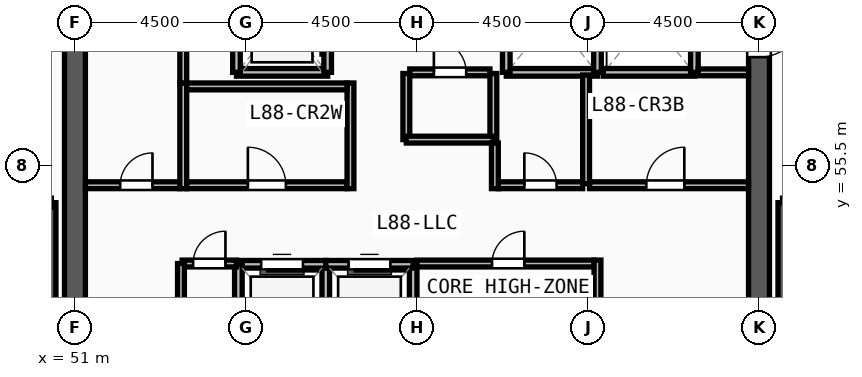
"""IFC4 building model, lengths in metres.
Left out: names, types, materials, properties, quantities, classifications, styles, units other than length and angle.
Written with IfcOpenShell. Run it as: python <this file> out.ifc"""

import sys

from ifc_helpers import new_model, si_unit, direction, frame, frame_2d, origin, place, context, subcontext, project, spatial, rectangle, extrude, source, transform, mapped, element, fill, save


model = new_model("IFC4")
c1 = context("Model", 3, precision=1e-05, world=origin(), true_north=direction((0.0, 1.0)))
c2 = subcontext(c1, "Body", "Model", "MODEL_VIEW")
j1 = project(units=[si_unit("LENGTHUNIT", "METRE"), si_unit("PLANEANGLEUNIT", "RADIAN")], contexts=[c1])
p1 = place(None, origin())
s1 = spatial("IfcSite", under=j1, at=p1, CompositionType="ELEMENT")
p2 = place(p1, origin())
s2 = spatial("IfcBuilding", under=s1, at=p2, CompositionType="ELEMENT")
p3 = place(p2, frame((0.0, 0.0, 339.75)))
s3 = spatial("IfcBuildingStorey", under=s2, at=p3, CompositionType="ELEMENT", Elevation=339.75)
p4 = place(p3, frame((69.0, 60.9, 0.0), z_axis=(0.0, 0.0, 1.0), x_axis=(0.0, -1.0, 0.0)))
e1 = element("IfcWall", 1, at=p4, inside=s3, PredefinedType="SHEAR", context=c2, shape_type="SweptSolid", body=[
    extrude(rectangle(XDim=13.8, YDim=0.55, at=frame_2d((6.9, 0.0))), origin(), (0.0, 0.0, 1.0), 3.57),
])
m1 = source(origin(), c2, "Body", "SweptSolid", [
    extrude(rectangle(XDim=1.2, YDim=2.2, at=frame_2d((0.6, 1.1))), frame((0.0, 0.285, 0.0), z_axis=(0.0, -1.0, 0.0), x_axis=(1.0, 0.0, 0.0)), (0.0, 0.0, 1.0), 0.57),
])
p5 = place(p4, frame((1.35, 0.0, 0.0)))
e2 = element("IfcOpeningElement", 2, at=p5, cuts=e1, PredefinedType="OPENING", context=c2, shape_type="MappedRepresentation", body=[
    mapped(m1, transform((0.0, 0.0, 0.0), x_axis=(1.0, 0.0, 0.0), y_axis=(0.0, 1.0, 0.0), z_axis=(0.0, 0.0, 1.0), scale=1.0)),
])
p6 = place(p3, frame((51.0, 47.1, 0.0), z_axis=(0.0, 0.0, 1.0), x_axis=(0.0, 1.0, 0.0)))
e3 = element("IfcWall", 3, at=p6, inside=s3, PredefinedType="SHEAR", context=c2, shape_type="SweptSolid", body=[
    extrude(rectangle(XDim=13.8, YDim=0.55, at=frame_2d((6.9, 0.0))), origin(), (0.0, 0.0, 1.0), 3.57),
])
for number, where, z_axis, x_axis in (
    (4, (50.38, 46.7, 0.0), (0.0, 0.0, 1.0), (0.0, 1.0, 0.0)),
    (5, (69.62, 54.52, 0.0), (0.0, 0.0, 1.0), (0.0, -1.0, 0.0)),
):
    element("IfcWall", number, at=place(p3, frame(where, z_axis=z_axis, x_axis=x_axis)), inside=s3, PredefinedType="SOLIDWALL", context=c2, shape_type="SweptSolid", body=[
        extrude(rectangle(XDim=7.82, YDim=0.24, at=frame_2d((3.91, 0.0))), origin(), (0.0, 0.0, 1.0), 3.57),
    ])
p7 = place(p3, frame((55.25, 57.95, 0.0), z_axis=(0.0, 0.0, 1.0), x_axis=(1.0, 0.0, 0.0)))
e6 = element("IfcWall", 6, at=p7, inside=s3, PredefinedType="SOLIDWALL", context=c2, shape_type="SweptSolid", body=[
    extrude(rectangle(XDim=2.4, YDim=0.2, at=frame_2d((1.2, 0.0))), origin(), (0.0, 0.0, 1.0), 3.57),
])
p8 = place(p3, frame((57.65, 57.95, 0.0), z_axis=(0.0, 0.0, 1.0), x_axis=(0.0, 1.0, 0.0)))
e7 = element("IfcWall", 7, at=p8, inside=s3, PredefinedType="SOLIDWALL", context=c2, shape_type="SweptSolid", body=[
    extrude(rectangle(XDim=2.93, YDim=0.2, at=frame_2d((1.465, 0.0))), origin(), (0.0, 0.0, 1.0), 3.57),
])
m2 = source(origin(), c2, "Body", "SweptSolid", [
    extrude(rectangle(XDim=1.2, YDim=2.3, at=frame_2d((0.6, 1.15))), frame((0.0, 0.11, 0.0), z_axis=(0.0, -1.0, 0.0), x_axis=(1.0, 0.0, 0.0)), (0.0, 0.0, 1.0), 0.22),
])
p9 = place(p8, frame((0.865, 0.0, 0.0)))
e8 = element("IfcOpeningElement", 8, at=p9, cuts=e7, PredefinedType="OPENING", context=c2, shape_type="MappedRepresentation", body=[
    mapped(m2, transform((0.0, 0.0, 0.0), x_axis=(1.0, 0.0, 0.0), y_axis=(0.0, 1.0, 0.0), z_axis=(0.0, 0.0, 1.0), scale=1.0)),
])
p10 = place(p3, frame((55.25, 60.88, 0.0), z_axis=(0.0, 0.0, 1.0), x_axis=(0.0, -1.0, 0.0)))
e9 = element("IfcWall", 9, at=p10, inside=s3, PredefinedType="SOLIDWALL", context=c2, shape_type="SweptSolid", body=[
    extrude(rectangle(XDim=2.93, YDim=0.2, at=frame_2d((1.465, 0.0))), origin(), (0.0, 0.0, 1.0), 3.57),
])
p11 = place(p3, frame((62.35, 57.95, 0.0), z_axis=(0.0, 0.0, 1.0), x_axis=(1.0, 0.0, 0.0)))
e10 = element("IfcWall", 10, at=p11, inside=s3, PredefinedType="SOLIDWALL", context=c2, shape_type="SweptSolid", body=[
    extrude(rectangle(XDim=2.4, YDim=0.2, at=frame_2d((1.2, 0.0))), origin(), (0.0, 0.0, 1.0), 3.57),
])
for number, where, z_axis, x_axis in (
    (11, (64.75, 57.95, 0.0), (0.0, 0.0, 1.0), (0.0, 1.0, 0.0)),
    (12, (62.35, 60.88, 0.0), (0.0, 0.0, 1.0), (0.0, -1.0, 0.0)),
):
    element("IfcWall", number, at=place(p3, frame(where, z_axis=z_axis, x_axis=x_axis)), inside=s3, PredefinedType="SOLIDWALL", context=c2, shape_type="SweptSolid", body=[
        extrude(rectangle(XDim=2.93, YDim=0.2, at=frame_2d((1.465, 0.0))), origin(), (0.0, 0.0, 1.0), 3.57),
    ])
p12 = place(p3, frame((64.9, 57.95, 0.0), z_axis=(0.0, 0.0, 1.0), x_axis=(1.0, 0.0, 0.0)))
e13 = element("IfcWall", 13, at=p12, inside=s3, PredefinedType="SOLIDWALL", context=c2, shape_type="SweptSolid", body=[
    extrude(rectangle(XDim=2.4, YDim=0.2, at=frame_2d((1.2, 0.0))), origin(), (0.0, 0.0, 1.0), 3.57),
])
p13 = place(p3, frame((67.3, 57.95, 0.0), z_axis=(0.0, 0.0, 1.0), x_axis=(0.0, 1.0, 0.0)))
e14 = element("IfcWall", 14, at=p13, inside=s3, PredefinedType="SOLIDWALL", context=c2, shape_type="SweptSolid", body=[
    extrude(rectangle(XDim=2.93, YDim=0.2, at=frame_2d((1.465, 0.0))), origin(), (0.0, 0.0, 1.0), 3.57),
])
p14 = place(p3, frame((57.6, 50.3, 0.0), z_axis=(0.0, 0.0, 1.0), x_axis=(0.0, 1.0, 0.0)))
e15 = element("IfcWall", 15, at=p14, inside=s3, PredefinedType="SOLIDWALL", context=c2, shape_type="SweptSolid", body=[
    extrude(rectangle(XDim=2.6, YDim=0.2, at=frame_2d((1.3, 0.0))), origin(), (0.0, 0.0, 1.0), 3.57),
])
p15 = place(p3, frame((57.6, 52.9, 0.0), z_axis=(0.0, 0.0, 1.0), x_axis=(-1.0, 0.0, 0.0)))
e16 = element("IfcWall", 16, at=p15, inside=s3, PredefinedType="SOLIDWALL", context=c2, shape_type="SweptSolid", body=[
    extrude(rectangle(XDim=2.3, YDim=0.2, at=frame_2d((1.15, 0.0))), origin(), (0.0, 0.0, 1.0), 3.57),
])
m3 = source(origin(), c2, "Body", "SweptSolid", [
    extrude(rectangle(XDim=1.1, YDim=2.2, at=frame_2d((0.55, 1.1))), frame((0.0, 0.11, 0.0), z_axis=(0.0, -1.0, 0.0), x_axis=(1.0, 0.0, 0.0)), (0.0, 0.0, 1.0), 0.22),
])
p16 = place(p15, frame((0.6, 0.0, 0.0)))
e17 = element("IfcOpeningElement", 17, at=p16, cuts=e16, PredefinedType="OPENING", context=c2, shape_type="MappedRepresentation", body=[
    mapped(m3, transform((0.0, 0.0, 0.0), x_axis=(1.0, 0.0, 0.0), y_axis=(0.0, 1.0, 0.0), z_axis=(0.0, 0.0, 1.0), scale=1.0)),
])
for number, where, z_axis, x_axis in (
    (18, (55.3, 52.9, 0.0), (0.0, 0.0, 1.0), (0.0, -1.0, 0.0)),
    (19, (59.9, 50.3, 0.0), (0.0, 0.0, 1.0), (0.0, 1.0, 0.0)),
):
    element("IfcWall", number, at=place(p3, frame(where, z_axis=z_axis, x_axis=x_axis)), inside=s3, PredefinedType="SOLIDWALL", context=c2, shape_type="SweptSolid", body=[
        extrude(rectangle(XDim=2.6, YDim=0.2, at=frame_2d((1.3, 0.0))), origin(), (0.0, 0.0, 1.0), 3.57),
    ])
p17 = place(p3, frame((59.9, 52.9, 0.0), z_axis=(0.0, 0.0, 1.0), x_axis=(-1.0, 0.0, 0.0)))
e20 = element("IfcWall", 20, at=p17, inside=s3, PredefinedType="SOLIDWALL", context=c2, shape_type="SweptSolid", body=[
    extrude(rectangle(XDim=2.3, YDim=0.2, at=frame_2d((1.15, 0.0))), origin(), (0.0, 0.0, 1.0), 3.57),
])
p18 = place(p17, frame((0.6, 0.0, 0.0)))
e21 = element("IfcOpeningElement", 21, at=p18, cuts=e20, PredefinedType="OPENING", context=c2, shape_type="MappedRepresentation", body=[
    mapped(m3, transform((0.0, 0.0, 0.0), x_axis=(1.0, 0.0, 0.0), y_axis=(0.0, 1.0, 0.0), z_axis=(0.0, 0.0, 1.0), scale=1.0)),
])
p19 = place(p3, frame((60.0, 52.92, 0.0), z_axis=(0.0, 0.0, 1.0), x_axis=(1.0, 0.0, 0.0)))
e22 = element("IfcWall", 22, at=p19, inside=s3, PredefinedType="PARTITIONING", context=c2, shape_type="SweptSolid", body=[
    extrude(rectangle(XDim=4.66, YDim=0.18, at=frame_2d((2.33, 0.0))), origin(), (0.0, 0.0, 1.0), 3.57),
])
m4 = source(origin(), c2, "Body", "SweptSolid", [
    extrude(rectangle(XDim=0.85, YDim=2.1, at=frame_2d((0.425, 1.05))), frame((0.0, 0.1, 0.0), z_axis=(0.0, -1.0, 0.0), x_axis=(1.0, 0.0, 0.0)), (0.0, 0.0, 1.0), 0.2),
])
p20 = place(p19, frame((1.975, 0.0, 0.0)))
e23 = element("IfcOpeningElement", 23, at=p20, cuts=e22, PredefinedType="OPENING", context=c2, shape_type="MappedRepresentation", body=[
    mapped(m4, transform((0.0, 0.0, 0.0), x_axis=(1.0, 0.0, 0.0), y_axis=(0.0, 1.0, 0.0), z_axis=(0.0, 0.0, 1.0), scale=1.0)),
])
p21 = place(p3, frame((53.94, 54.98, 0.0), z_axis=(0.0, 0.0, 1.0), x_axis=(1.0, 0.0, 0.0)))
e24 = element("IfcWall", 24, at=p21, inside=s3, PredefinedType="PARTITIONING", context=c2, shape_type="SweptSolid", body=[
    extrude(rectangle(XDim=4.22, YDim=0.18, at=frame_2d((2.11, 0.0))), origin(), (0.0, 0.0, 1.0), 3.57),
])
m5 = source(origin(), c2, "Body", "SweptSolid", [
    extrude(rectangle(XDim=1.0, YDim=2.2, at=frame_2d((0.5, 1.1))), frame((0.0, 0.1, 0.0), z_axis=(0.0, -1.0, 0.0), x_axis=(1.0, 0.0, 0.0)), (0.0, 0.0, 1.0), 0.2),
])
p22 = place(p21, frame((1.61, 0.0, 0.0)))
e25 = element("IfcOpeningElement", 25, at=p22, cuts=e24, PredefinedType="OPENING", context=c2, shape_type="MappedRepresentation", body=[
    mapped(m5, transform((0.0, 0.0, 0.0), x_axis=(1.0, 0.0, 0.0), y_axis=(0.0, 1.0, 0.0), z_axis=(0.0, 0.0, 1.0), scale=1.0)),
])
p23 = place(p3, frame((51.275, 54.98, 0.0), z_axis=(0.0, 0.0, 1.0), x_axis=(1.0, 0.0, 0.0)))
e26 = element("IfcWall", 26, at=p23, inside=s3, PredefinedType="PARTITIONING", context=c2, shape_type="SweptSolid", body=[
    extrude(rectangle(XDim=2.485, YDim=0.18, at=frame_2d((1.243, 0.0))), origin(), (0.0, 0.0, 1.0), 3.57),
])
p24 = place(p23, frame((0.915, 0.0, 0.0)))
e27 = element("IfcOpeningElement", 27, at=p24, cuts=e26, PredefinedType="OPENING", context=c2, shape_type="MappedRepresentation", body=[
    mapped(m4, transform((0.0, 0.0, 0.0), x_axis=(1.0, 0.0, 0.0), y_axis=(0.0, 1.0, 0.0), z_axis=(0.0, 0.0, 1.0), scale=1.0)),
])
p25 = place(p3, frame((62.14, 54.98, 0.0), z_axis=(0.0, 0.0, 1.0), x_axis=(1.0, 0.0, 0.0)))
e28 = element("IfcWall", 28, at=p25, inside=s3, PredefinedType="PARTITIONING", context=c2, shape_type="SweptSolid", body=[
    extrude(rectangle(XDim=2.22, YDim=0.18, at=frame_2d((1.11, 0.0))), origin(), (0.0, 0.0, 1.0), 3.57),
])
p26 = place(p25, frame((0.685, 0.0, 0.0)))
e29 = element("IfcOpeningElement", 29, at=p26, cuts=e28, PredefinedType="OPENING", context=c2, shape_type="MappedRepresentation", body=[
    mapped(m4, transform((0.0, 0.0, 0.0), x_axis=(1.0, 0.0, 0.0), y_axis=(0.0, 1.0, 0.0), z_axis=(0.0, 0.0, 1.0), scale=1.0)),
])
p27 = place(p3, frame((64.54, 54.98, 0.0), z_axis=(0.0, 0.0, 1.0), x_axis=(1.0, 0.0, 0.0)))
e30 = element("IfcWall", 30, at=p27, inside=s3, PredefinedType="PARTITIONING", context=c2, shape_type="SweptSolid", body=[
    extrude(rectangle(XDim=4.185, YDim=0.18, at=frame_2d((2.093, 0.0))), origin(), (0.0, 0.0, 1.0), 3.57),
])
p28 = place(p27, frame((1.495, 0.0, 0.0)))
e31 = element("IfcOpeningElement", 31, at=p28, cuts=e30, PredefinedType="OPENING", context=c2, shape_type="MappedRepresentation", body=[
    mapped(m5, transform((0.0, 0.0, 0.0), x_axis=(1.0, 0.0, 0.0), y_axis=(0.0, 1.0, 0.0), z_axis=(0.0, 0.0, 1.0), scale=1.0)),
])
p29 = place(p3, frame((59.81, 57.95, 0.0), z_axis=(0.0, 0.0, 1.0), x_axis=(1.0, 0.0, 0.0)))
e32 = element("IfcWall", 32, at=p29, inside=s3, PredefinedType="PARTITIONING", context=c2, shape_type="SweptSolid", body=[
    extrude(rectangle(XDim=2.11, YDim=0.18, at=frame_2d((1.055, 0.0))), origin(), (0.0, 0.0, 1.0), 3.57),
])
p30 = place(p29, frame((0.635, 0.0, 0.0)))
e33 = element("IfcOpeningElement", 33, at=p30, cuts=e32, PredefinedType="OPENING", context=c2, shape_type="MappedRepresentation", body=[
    mapped(m4, transform((0.0, 0.0, 0.0), x_axis=(1.0, 0.0, 0.0), y_axis=(0.0, 1.0, 0.0), z_axis=(0.0, 0.0, 1.0), scale=1.0)),
])
p31 = place(p3, frame((53.82, 52.92, 0.0), z_axis=(0.0, 0.0, 1.0), x_axis=(1.0, 0.0, 0.0)))
e34 = element("IfcWall", 34, at=p31, inside=s3, PredefinedType="PARTITIONING", context=c2, shape_type="SweptSolid", body=[
    extrude(rectangle(XDim=1.43, YDim=0.18, at=frame_2d((0.715, 0.0))), origin(), (0.0, 0.0, 1.0), 3.57),
])
p32 = place(p31, frame((0.29, 0.0, 0.0)))
e35 = element("IfcOpeningElement", 35, at=p32, cuts=e34, PredefinedType="OPENING", context=c2, shape_type="MappedRepresentation", body=[
    mapped(m4, transform((0.0, 0.0, 0.0), x_axis=(1.0, 0.0, 0.0), y_axis=(0.0, 1.0, 0.0), z_axis=(0.0, 0.0, 1.0), scale=1.0)),
])
p33 = place(p3, frame((64.45, 55.02, 0.0), z_axis=(0.0, 0.0, 1.0), x_axis=(0.0, 1.0, 0.0)))
e36 = element("IfcWall", 36, at=p33, inside=s3, PredefinedType="PARTITIONING", context=c2, shape_type="SweptSolid", body=[
    extrude(rectangle(XDim=2.86, YDim=0.18, at=frame_2d((1.43, 0.0))), origin(), (0.0, 0.0, 1.0), 3.57),
])
for number, where, z_axis, x_axis in (
    (37, (59.72, 56.18, 0.0), (0.0, 0.0, 1.0), (0.0, 1.0, 0.0)),
    (38, (62.01, 56.18, 0.0), (0.0, 0.0, 1.0), (0.0, 1.0, 0.0)),
):
    element("IfcWall", number, at=place(p3, frame(where, z_axis=z_axis, x_axis=x_axis)), inside=s3, PredefinedType="PARTITIONING", context=c2, shape_type="SweptSolid", body=[
        extrude(rectangle(XDim=1.74, YDim=0.18, at=frame_2d((0.87, 0.0))), origin(), (0.0, 0.0, 1.0), 3.57),
    ])
p34 = place(p3, frame((59.72, 56.18, 0.0), z_axis=(0.0, 0.0, 1.0), x_axis=(1.0, 0.0, 0.0)))
e39 = element("IfcWall", 39, at=p34, inside=s3, PredefinedType="PARTITIONING", context=c2, shape_type="SweptSolid", body=[
    extrude(rectangle(XDim=2.29, YDim=0.18, at=frame_2d((1.145, 0.0))), origin(), (0.0, 0.0, 1.0), 3.57),
])
p35 = place(p3, frame((53.79, 50.35, 0.0), z_axis=(0.0, 0.0, 1.0), x_axis=(0.0, 1.0, 0.0)))
e40 = element("IfcWall", 40, at=p35, inside=s3, PredefinedType="PARTITIONING", context=c2, shape_type="SweptSolid", body=[
    extrude(rectangle(XDim=2.57, YDim=0.18, at=frame_2d((1.285, 0.0))), origin(), (0.0, 0.0, 1.0), 3.57),
])
p36 = place(p3, frame((64.75, 50.22, 0.0), z_axis=(0.0, 0.0, 1.0), x_axis=(0.0, 1.0, 0.0)))
e41 = element("IfcWall", 41, at=p36, inside=s3, PredefinedType="PARTITIONING", context=c2, shape_type="SweptSolid", body=[
    extrude(rectangle(XDim=2.79, YDim=0.18, at=frame_2d((1.395, 0.0))), origin(), (0.0, 0.0, 1.0), 3.57),
])
for number, where, z_axis, x_axis in (
    (42, (53.85, 54.89, 0.0), (0.0, 0.0, 1.0), (0.0, 1.0, 0.0)),
    (43, (58.25, 54.89, 0.0), (0.0, 0.0, 1.0), (0.0, 1.0, 0.0)),
):
    element("IfcWall", number, at=place(p3, frame(where, z_axis=z_axis, x_axis=x_axis)), inside=s3, PredefinedType="PARTITIONING", context=c2, shape_type="SweptSolid", body=[
        extrude(rectangle(XDim=2.78, YDim=0.18, at=frame_2d((1.39, 0.0))), origin(), (0.0, 0.0, 1.0), 3.57),
    ])
p37 = place(p3, frame((53.94, 57.58, 0.0), z_axis=(0.0, 0.0, 1.0), x_axis=(1.0, 0.0, 0.0)))
e44 = element("IfcWall", 44, at=p37, inside=s3, PredefinedType="PARTITIONING", context=c2, shape_type="SweptSolid", body=[
    extrude(rectangle(XDim=4.22, YDim=0.18, at=frame_2d((2.11, 0.0))), origin(), (0.0, 0.0, 1.0), 3.57),
])
p38 = place(p3, frame((53.85, 57.67, 0.0), z_axis=(0.0, 0.0, 1.0), x_axis=(0.0, 1.0, 0.0)))
e45 = element("IfcWall", 45, at=p38, inside=s3, PredefinedType="PARTITIONING", context=c2, shape_type="SweptSolid", body=[
    extrude(rectangle(XDim=3.42, YDim=0.18, at=frame_2d((1.71, 0.0))), origin(), (0.0, 0.0, 1.0), 3.57),
])
p39 = place(p3, frame((62.05, 54.89, 0.0), z_axis=(0.0, 0.0, 1.0), x_axis=(0.0, 1.0, 0.0)))
e46 = element("IfcWall", 46, at=p39, inside=s3, PredefinedType="PARTITIONING", context=c2, shape_type="SweptSolid", body=[
    extrude(rectangle(XDim=1.2, YDim=0.18, at=frame_2d((0.6, 0.0))), origin(), (0.0, 0.0, 1.0), 3.57),
])
p40 = place(p3, frame((67.4, 57.95, 0.0), z_axis=(0.0, 0.0, 1.0), x_axis=(1.0, 0.0, 0.0)))
e47 = element("IfcWall", 47, at=p40, inside=s3, PredefinedType="PARTITIONING", context=c2, shape_type="SweptSolid", body=[
    extrude(rectangle(XDim=1.325, YDim=0.18, at=frame_2d((0.663, 0.0))), origin(), (0.0, 0.0, 1.0), 3.57),
])
m6 = source(origin(), c2, "Body", "SweptSolid", [
    extrude(rectangle(XDim=1.2, YDim=2.2, at=frame_2d((0.6, 1.1))), frame((0.0, 0.025, 0.0), z_axis=(0.0, -1.0, 0.0), x_axis=(1.0, 0.0, 0.0)), (0.0, 0.0, 1.0), 0.05),
])
p41 = place(p5, origin())
e48 = element("IfcDoor", 48, at=p41, inside=s3, OperationType="SINGLE_SWING_LEFT", PredefinedType="DOOR", context=c2, shape_type="MappedRepresentation", body=[
    mapped(m6, transform((0.0, 0.0, 0.0), x_axis=(1.0, 0.0, 0.0), y_axis=(0.0, 1.0, 0.0), z_axis=(0.0, 0.0, 1.0), scale=1.0)),
])
fill(e2, e48)
m7 = source(origin(), c2, "Body", "SweptSolid", [
    extrude(rectangle(XDim=1.1, YDim=2.2, at=frame_2d((0.55, 1.1))), frame((0.0, 0.025, 0.0), z_axis=(0.0, -1.0, 0.0), x_axis=(1.0, 0.0, 0.0)), (0.0, 0.0, 1.0), 0.05),
])
p42 = place(p16, origin())
e49 = element("IfcDoor", 49, at=p42, inside=s3, OperationType="SLIDING_TO_LEFT", PredefinedType="DOOR", context=c2, shape_type="MappedRepresentation", body=[
    mapped(m7, transform((0.0, 0.0, 0.0), x_axis=(1.0, 0.0, 0.0), y_axis=(0.0, 1.0, 0.0), z_axis=(0.0, 0.0, 1.0), scale=1.0)),
])
fill(e17, e49)
p43 = place(p18, origin())
e50 = element("IfcDoor", 50, at=p43, inside=s3, OperationType="SLIDING_TO_LEFT", PredefinedType="DOOR", context=c2, shape_type="MappedRepresentation", body=[
    mapped(m7, transform((0.0, 0.0, 0.0), x_axis=(1.0, 0.0, 0.0), y_axis=(0.0, 1.0, 0.0), z_axis=(0.0, 0.0, 1.0), scale=1.0)),
])
fill(e21, e50)
m8 = source(origin(), c2, "Body", "SweptSolid", [
    extrude(rectangle(XDim=0.85, YDim=2.1, at=frame_2d((0.425, 1.05))), frame((0.0, 0.025, 0.0), z_axis=(0.0, -1.0, 0.0), x_axis=(1.0, 0.0, 0.0)), (0.0, 0.0, 1.0), 0.05),
])
p44 = place(p20, origin())
e51 = element("IfcDoor", 51, at=p44, inside=s3, OperationType="SINGLE_SWING_RIGHT", PredefinedType="DOOR", context=c2, shape_type="MappedRepresentation", body=[
    mapped(m8, transform((0.0, 0.0, 0.0), x_axis=(1.0, 0.0, 0.0), y_axis=(0.0, 1.0, 0.0), z_axis=(0.0, 0.0, 1.0), scale=1.0)),
])
fill(e23, e51)
m9 = source(origin(), c2, "Body", "SweptSolid", [
    extrude(rectangle(XDim=1.0, YDim=2.2, at=frame_2d((0.5, 1.1))), frame((0.0, 0.025, 0.0), z_axis=(0.0, -1.0, 0.0), x_axis=(1.0, 0.0, 0.0)), (0.0, 0.0, 1.0), 0.05),
])
p45 = place(p22, origin())
e52 = element("IfcDoor", 52, at=p45, inside=s3, OperationType="SINGLE_SWING_LEFT", PredefinedType="DOOR", context=c2, shape_type="MappedRepresentation", body=[
    mapped(m9, transform((0.0, 0.0, 0.0), x_axis=(1.0, 0.0, 0.0), y_axis=(0.0, 1.0, 0.0), z_axis=(0.0, 0.0, 1.0), scale=1.0)),
])
fill(e25, e52)
p46 = place(p24, origin())
e53 = element("IfcDoor", 53, at=p46, inside=s3, OperationType="SINGLE_SWING_RIGHT", PredefinedType="DOOR", context=c2, shape_type="MappedRepresentation", body=[
    mapped(m8, transform((0.0, 0.0, 0.0), x_axis=(1.0, 0.0, 0.0), y_axis=(0.0, 1.0, 0.0), z_axis=(0.0, 0.0, 1.0), scale=1.0)),
])
fill(e27, e53)
p47 = place(p26, origin())
e54 = element("IfcDoor", 54, at=p47, inside=s3, OperationType="SINGLE_SWING_LEFT", PredefinedType="DOOR", context=c2, shape_type="MappedRepresentation", body=[
    mapped(m8, transform((0.0, 0.0, 0.0), x_axis=(1.0, 0.0, 0.0), y_axis=(0.0, 1.0, 0.0), z_axis=(0.0, 0.0, 1.0), scale=1.0)),
])
fill(e29, e54)
p48 = place(p28, origin())
e55 = element("IfcDoor", 55, at=p48, inside=s3, OperationType="SINGLE_SWING_RIGHT", PredefinedType="DOOR", context=c2, shape_type="MappedRepresentation", body=[
    mapped(m9, transform((0.0, 0.0, 0.0), x_axis=(1.0, 0.0, 0.0), y_axis=(0.0, 1.0, 0.0), z_axis=(0.0, 0.0, 1.0), scale=1.0)),
])
fill(e31, e55)
p49 = place(p30, origin())
e56 = element("IfcDoor", 56, at=p49, inside=s3, OperationType="SINGLE_SWING_LEFT", PredefinedType="DOOR", context=c2, shape_type="MappedRepresentation", body=[
    mapped(m8, transform((0.0, 0.0, 0.0), x_axis=(1.0, 0.0, 0.0), y_axis=(0.0, 1.0, 0.0), z_axis=(0.0, 0.0, 1.0), scale=1.0)),
])
fill(e33, e56)
p50 = place(p32, origin())
e57 = element("IfcDoor", 57, at=p50, inside=s3, OperationType="SINGLE_SWING_RIGHT", PredefinedType="DOOR", context=c2, shape_type="MappedRepresentation", body=[
    mapped(m8, transform((0.0, 0.0, 0.0), x_axis=(1.0, 0.0, 0.0), y_axis=(0.0, 1.0, 0.0), z_axis=(0.0, 0.0, 1.0), scale=1.0)),
])
fill(e35, e57)
save(model, sys.argv[1])
